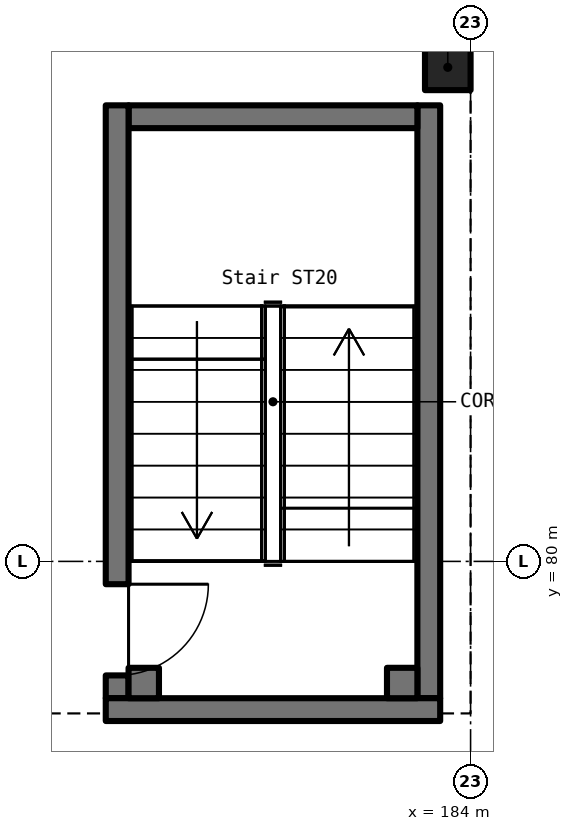
"""IFC4 building model, lengths in metres.
Left out: names, types, materials, properties, quantities, classifications, styles, units other than length and angle.
Written with IfcOpenShell. Run it as: python <this file> out.ifc"""

import sys

from ifc_helpers import new_model, si_unit, direction, frame, frame_2d, origin, origin_2d, place, context, subcontext, project, spatial, rectangle, extrude, element, fill, save


model = new_model("IFC4")
c1 = context("Model", 3, precision=1e-05, world=origin(), true_north=direction((0.0, 1.0)))
c2 = subcontext(c1, "Body", "Model", "MODEL_VIEW")
j1 = project(units=[si_unit("LENGTHUNIT", "METRE"), si_unit("PLANEANGLEUNIT", "RADIAN")], contexts=[c1])
p1 = place(None, origin())
s1 = spatial("IfcSite", under=j1, at=p1, CompositionType="ELEMENT")
p2 = place(p1, origin())
s2 = spatial("IfcBuilding", under=s1, at=p2, CompositionType="ELEMENT")
p3 = place(p2, frame((0.0, 0.0, -6.0)))
s3 = spatial("IfcBuildingStorey", under=s2, at=p3, CompositionType="ELEMENT", Elevation=-6.0)
p4 = place(p3, frame((183.7, 86.5, 0.0), z_axis=(0.0, 0.0, 1.0), x_axis=(1.0, 0.0, 0.0)))
e1 = element("IfcColumn", 1, at=p4, inside=s3, PredefinedType="COLUMN", context=c2, shape_type="SweptSolid", body=[
    extrude(rectangle(XDim=0.6, YDim=0.6, at=origin_2d()), origin(), (0.0, 0.0, 1.0), 6.0),
])
p5 = place(p3, frame((183.45, 78.2, 0.0), z_axis=(0.0, 0.0, 1.0), x_axis=(0.0, 1.0, 0.0)))
e2 = element("IfcWall", 2, at=p5, inside=s3, PredefinedType="SOLIDWALL", context=c2, shape_type="SweptSolid", body=[
    extrude(rectangle(XDim=7.8, YDim=0.3, at=frame_2d((3.9, 0.0))), origin(), (0.0, 0.0, 1.0), 6.0),
])
p6 = place(p3, frame((183.3, 85.85, 0.0), z_axis=(0.0, 0.0, 1.0), x_axis=(-1.0, 0.0, 0.0)))
e3 = element("IfcWall", 3, at=p6, inside=s3, PredefinedType="SOLIDWALL", context=c2, shape_type="SweptSolid", body=[
    extrude(rectangle(XDim=3.8, YDim=0.3, at=frame_2d((1.9, 0.0))), origin(), (0.0, 0.0, 1.0), 6.0),
])
p7 = place(p3, frame((179.35, 86.0, 0.0), z_axis=(0.0, 0.0, 1.0), x_axis=(0.0, -1.0, 0.0)))
e4 = element("IfcWall", 4, at=p7, inside=s3, PredefinedType="SOLIDWALL", context=c2, shape_type="SweptSolid", body=[
    extrude(rectangle(XDim=7.8, YDim=0.3, at=frame_2d((3.9, 0.0))), origin(), (0.0, 0.0, 1.0), 6.0),
])
p8 = place(p7, frame((6.3, 0.0, 0.0)))
e5 = element("IfcOpeningElement", 5, at=p8, cuts=e4, PredefinedType="OPENING", context=c2, shape_type="SweptSolid", body=[
    extrude(rectangle(XDim=1.2, YDim=2.1, at=frame_2d((0.6, 1.05))), frame((0.0, 0.162, 0.0), z_axis=(0.0, -1.0, 0.0), x_axis=(1.0, 0.0, 0.0)), (0.0, 0.0, 1.0), 0.324),
])
p9 = place(p3, frame((179.2, 78.05, 0.0), z_axis=(0.0, 0.0, 1.0), x_axis=(1.0, 0.0, 0.0)))
e6 = element("IfcWall", 6, at=p9, inside=s3, PredefinedType="SOLIDWALL", context=c2, shape_type="SweptSolid", body=[
    extrude(rectangle(XDim=4.4, YDim=0.3, at=frame_2d((2.2, 0.0))), origin(), (0.0, 0.0, 1.0), 6.0),
])
p10 = place(p3, frame((179.5, 78.4, 0.0), z_axis=(0.0, 0.0, 1.0), x_axis=(1.0, 0.0, 0.0)))
e7 = element("IfcWall", 7, at=p10, inside=s3, PredefinedType="SOLIDWALL", context=c2, shape_type="SweptSolid", body=[
    extrude(rectangle(XDim=0.4, YDim=0.4, at=frame_2d((0.2, 0.0))), origin(), (0.0, 0.0, 1.0), 6.0),
])
p11 = place(p3, frame((182.9, 78.4, 0.0), z_axis=(0.0, 0.0, 1.0), x_axis=(1.0, 0.0, 0.0)))
e8 = element("IfcWall", 8, at=p11, inside=s3, PredefinedType="SOLIDWALL", context=c2, shape_type="SweptSolid", body=[
    extrude(rectangle(XDim=0.4, YDim=0.4, at=frame_2d((0.2, 0.0))), origin(), (0.0, 0.0, 1.0), 6.0),
])
p12 = place(p8, origin())
e9 = element("IfcDoor", 9, at=p12, inside=s3, OperationType="SINGLE_SWING_LEFT", PredefinedType="DOOR", context=c2, shape_type="SweptSolid", body=[
    extrude(rectangle(XDim=1.2, YDim=2.1, at=frame_2d((0.6, 1.05))), frame((0.0, 0.025, 0.0), z_axis=(0.0, -1.0, 0.0), x_axis=(1.0, 0.0, 0.0)), (0.0, 0.0, 1.0), 0.05),
])
fill(e5, e9)
save(model, sys.argv[1])
